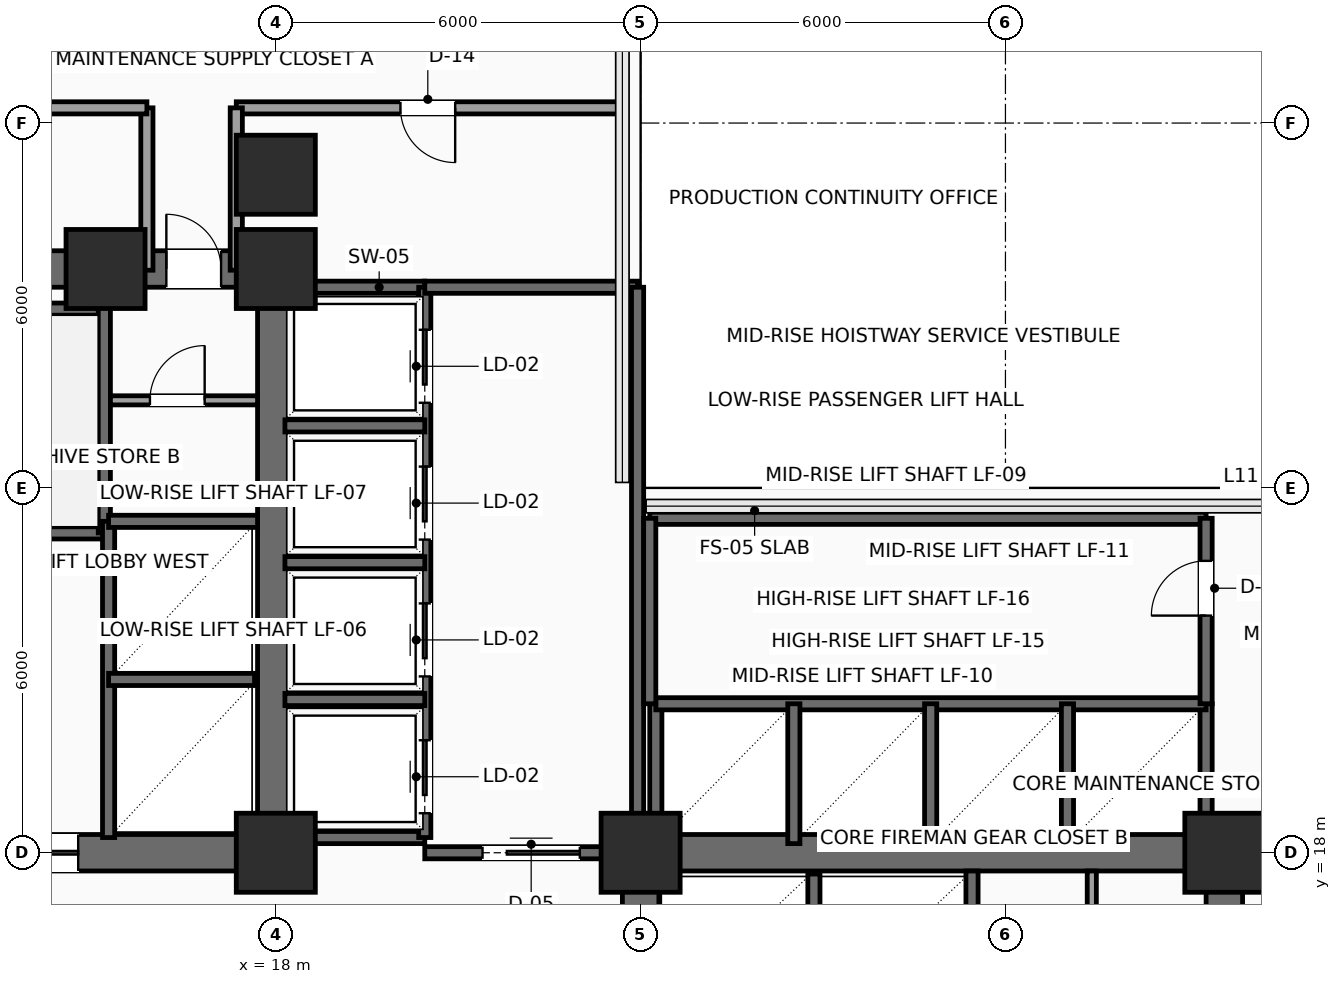
"""IFC4 building model, lengths in metres.
Left out: names, types, materials, properties, quantities, classifications, styles, units other than length and angle.
Written with IfcOpenShell. Run it as: python <this file> out.ifc"""

import sys

from ifc_helpers import new_model, si_unit, direction, frame, frame_2d, origin, origin_2d, place, context, subcontext, project, spatial, rectangle, extrude, element, fill, save


model = new_model("IFC4")
c1 = context("Model", 3, precision=1e-05, world=origin(), true_north=direction((0.0, 1.0)))
c2 = subcontext(c1, "Body", "Model", "MODEL_VIEW")
j1 = project(units=[si_unit("LENGTHUNIT", "METRE"), si_unit("PLANEANGLEUNIT", "RADIAN")], contexts=[c1])
p1 = place(None, origin())
s1 = spatial("IfcSite", under=j1, at=p1, CompositionType="ELEMENT")
p2 = place(p1, origin())
s2 = spatial("IfcBuilding", under=s1, at=p2, CompositionType="ELEMENT")
p3 = place(p2, frame((0.0, 0.0, 51.9)))
s3 = spatial("IfcBuildingStorey", under=s2, at=p3, CompositionType="ELEMENT", Elevation=51.9)
for number, where, z_axis, x_axis in (
    (1, (18.0, 18.0, 0.0), (0.0, 0.0, 1.0), (1.0, 0.0, 0.0)),
    (2, (15.2, 27.6, 0.0), (0.0, 0.0, 1.0), (1.0, 0.0, 0.0)),
    (3, (18.0, 27.6, 0.0), (0.0, 0.0, 1.0), (1.0, 0.0, 0.0)),
    (4, (24.0, 18.0, 0.0), (0.0, 0.0, 1.0), (1.0, 0.0, 0.0)),
    (5, (33.6, 18.0, 0.0), (0.0, 0.0, 1.0), (1.0, 0.0, 0.0)),
    (6, (18.0, 29.15, 0.0), (0.0, 0.0, 1.0), (1.0, 0.0, 0.0)),
):
    element("IfcColumn", number, at=place(p3, frame(where, z_axis=z_axis, x_axis=x_axis)), inside=s3, PredefinedType="COLUMN", context=c2, shape_type="SweptSolid", body=[
        extrude(rectangle(XDim=1.3, YDim=1.3, at=origin_2d()), origin(), (0.0, 0.0, 1.0), 3.9),
    ])
p4 = place(p3, frame((6.0, 18.0, 0.0), z_axis=(0.0, 0.0, 1.0), x_axis=(1.0, 0.0, 0.0)))
e7 = element("IfcWall", 7, at=p4, inside=s3, PredefinedType="SHEAR", context=c2, shape_type="SweptSolid", body=[
    extrude(rectangle(XDim=12.0, YDim=0.6, at=frame_2d((6.0, 0.0))), origin(), (0.0, 0.0, 1.0), 3.65),
])
p5 = place(p4, frame((7.15, 0.0, 0.0)))
e8 = element("IfcOpeningElement", 8, at=p5, cuts=e7, PredefinedType="OPENING", context=c2, shape_type="SweptSolid", body=[
    extrude(rectangle(XDim=1.6, YDim=2.3, at=frame_2d((0.8, 1.15))), frame((0.0, 0.31, 0.0), z_axis=(0.0, -1.0, 0.0), x_axis=(1.0, 0.0, 0.0)), (0.0, 0.0, 1.0), 0.62),
])
p6 = place(p3, frame((6.0, 27.6, 0.0), z_axis=(0.0, 0.0, 1.0), x_axis=(1.0, 0.0, 0.0)))
e9 = element("IfcWall", 9, at=p6, inside=s3, PredefinedType="SHEAR", context=c2, shape_type="SweptSolid", body=[
    extrude(rectangle(XDim=12.0, YDim=0.6, at=frame_2d((6.0, 0.0))), origin(), (0.0, 0.0, 1.0), 3.65),
])
p7 = place(p6, frame((10.2, 0.0, 0.0)))
e10 = element("IfcOpeningElement", 10, at=p7, cuts=e9, PredefinedType="OPENING", context=c2, shape_type="SweptSolid", body=[
    extrude(rectangle(XDim=0.9, YDim=2.15, at=frame_2d((0.45, 1.075))), frame((0.0, 0.31, 0.0), z_axis=(0.0, -1.0, 0.0), x_axis=(1.0, 0.0, 0.0)), (0.0, 0.0, 1.0), 0.62),
])
for number, where, z_axis, x_axis in (
    (11, (18.0, 18.0, 0.0), (0.0, 0.0, 1.0), (0.0, 1.0, 0.0)),
    (12, (24.0, 18.0, 0.0), (0.0, 0.0, 1.0), (1.0, 0.0, 0.0)),
):
    element("IfcWall", number, at=place(p3, frame(where, z_axis=z_axis, x_axis=x_axis)), inside=s3, PredefinedType="SHEAR", context=c2, shape_type="SweptSolid", body=[
        extrude(rectangle(XDim=9.6, YDim=0.6, at=frame_2d((4.8, 0.0))), origin(), (0.0, 0.0, 1.0), 3.65),
    ])
p8 = place(p3, frame((24.0, 6.0, 0.0), z_axis=(0.0, 0.0, 1.0), x_axis=(0.0, 1.0, 0.0)))
e13 = element("IfcWall", 13, at=p8, inside=s3, PredefinedType="SHEAR", context=c2, shape_type="SweptSolid", body=[
    extrude(rectangle(XDim=12.0, YDim=0.6, at=frame_2d((6.0, 0.0))), origin(), (0.0, 0.0, 1.0), 3.65),
])
p9 = place(p8, frame((7.15, 0.0, 0.0)))
e14 = element("IfcOpeningElement", 14, at=p9, cuts=e13, PredefinedType="OPENING", context=c2, shape_type="SweptSolid", body=[
    extrude(rectangle(XDim=1.6, YDim=2.3, at=frame_2d((0.8, 1.15))), frame((0.0, 0.31, 0.0), z_axis=(0.0, -1.0, 0.0), x_axis=(1.0, 0.0, 0.0)), (0.0, 0.0, 1.0), 0.62),
])
p10 = place(p3, frame((33.6, 6.0, 0.0), z_axis=(0.0, 0.0, 1.0), x_axis=(0.0, 1.0, 0.0)))
e15 = element("IfcWall", 15, at=p10, inside=s3, PredefinedType="SHEAR", context=c2, shape_type="SweptSolid", body=[
    extrude(rectangle(XDim=12.0, YDim=0.6, at=frame_2d((6.0, 0.0))), origin(), (0.0, 0.0, 1.0), 3.65),
])
p11 = place(p10, frame((10.2, 0.0, 0.0)))
e16 = element("IfcOpeningElement", 16, at=p11, cuts=e15, PredefinedType="OPENING", context=c2, shape_type="SweptSolid", body=[
    extrude(rectangle(XDim=0.9, YDim=2.15, at=frame_2d((0.45, 1.075))), frame((0.0, 0.31, 0.0), z_axis=(0.0, -1.0, 0.0), x_axis=(1.0, 0.0, 0.0)), (0.0, 0.0, 1.0), 0.62),
])
p12 = place(p3, frame((6.3, 23.26, 0.0), z_axis=(0.0, 0.0, 1.0), x_axis=(1.0, 0.0, 0.0)))
e17 = element("IfcWall", 17, at=p12, inside=s3, PredefinedType="SHEAR", context=c2, shape_type="SweptSolid", body=[
    extrude(rectangle(XDim=8.88, YDim=0.2, at=frame_2d((4.44, 0.0))), origin(), (0.0, 0.0, 1.0), 3.65),
])
p13 = place(p12, frame((0.35, 0.0, 0.0)))
e18 = element("IfcOpeningElement", 18, at=p13, cuts=e17, PredefinedType="OPENING", context=c2, shape_type="SweptSolid", body=[
    extrude(rectangle(XDim=1.1, YDim=2.2, at=frame_2d((0.55, 1.1))), frame((0.0, 0.11, 0.0), z_axis=(0.0, -1.0, 0.0), x_axis=(1.0, 0.0, 0.0)), (0.0, 0.0, 1.0), 0.22),
])
p14 = place(p3, frame((6.3, 26.94, 0.0), z_axis=(0.0, 0.0, 1.0), x_axis=(1.0, 0.0, 0.0)))
e19 = element("IfcWall", 19, at=p14, inside=s3, PredefinedType="SHEAR", context=c2, shape_type="SweptSolid", body=[
    extrude(rectangle(XDim=8.88, YDim=0.2, at=frame_2d((4.44, 0.0))), origin(), (0.0, 0.0, 1.0), 3.65),
])
p15 = place(p3, frame((15.18, 23.26, 0.0), z_axis=(0.0, 0.0, 1.0), x_axis=(0.0, 1.0, 0.0)))
e20 = element("IfcWall", 20, at=p15, inside=s3, PredefinedType="SHEAR", context=c2, shape_type="SweptSolid", body=[
    extrude(rectangle(XDim=4.04, YDim=0.2, at=frame_2d((2.02, 0.0))), origin(), (0.0, 0.0, 1.0), 3.65),
])
p16 = place(p3, frame((15.25, 18.25, 0.0), z_axis=(0.0, 0.0, 1.0), x_axis=(0.0, 1.0, 0.0)))
e21 = element("IfcWall", 21, at=p16, inside=s3, PredefinedType="SHEAR", context=c2, shape_type="SweptSolid", body=[
    extrude(rectangle(XDim=5.2, YDim=0.2, at=frame_2d((2.6, 0.0))), origin(), (0.0, 0.0, 1.0), 3.65),
])
p17 = place(p3, frame((15.25, 20.85, 0.0), z_axis=(0.0, 0.0, 1.0), x_axis=(1.0, 0.0, 0.0)))
e22 = element("IfcWall", 22, at=p17, inside=s3, PredefinedType="SHEAR", context=c2, shape_type="SweptSolid", body=[
    extrude(rectangle(XDim=2.4, YDim=0.2, at=frame_2d((1.2, 0.0))), origin(), (0.0, 0.0, 1.0), 3.65),
])
p18 = place(p3, frame((15.25, 23.45, 0.0), z_axis=(0.0, 0.0, 1.0), x_axis=(1.0, 0.0, 0.0)))
e23 = element("IfcWall", 23, at=p18, inside=s3, PredefinedType="SHEAR", context=c2, shape_type="SweptSolid", body=[
    extrude(rectangle(XDim=2.45, YDim=0.2, at=frame_2d((1.225, 0.0))), origin(), (0.0, 0.0, 1.0), 3.65),
])
p19 = place(p3, frame((26.85, 15.25, 0.0), z_axis=(0.0, 0.0, 1.0), x_axis=(0.0, 1.0, 0.0)))
e24 = element("IfcWall", 24, at=p19, inside=s3, PredefinedType="SHEAR", context=c2, shape_type="SweptSolid", body=[
    extrude(rectangle(XDim=2.4, YDim=0.2, at=frame_2d((1.2, 0.0))), origin(), (0.0, 0.0, 1.0), 3.65),
])
p20 = place(p3, frame((29.45, 15.25, 0.0), z_axis=(0.0, 0.0, 1.0), x_axis=(0.0, 1.0, 0.0)))
e25 = element("IfcWall", 25, at=p20, inside=s3, PredefinedType="SHEAR", context=c2, shape_type="SweptSolid", body=[
    extrude(rectangle(XDim=2.45, YDim=0.2, at=frame_2d((1.225, 0.0))), origin(), (0.0, 0.0, 1.0), 3.65),
])
p21 = place(p3, frame((15.28, 25.44, 0.0), z_axis=(0.0, 0.0, 1.0), x_axis=(1.0, 0.0, 0.0)))
e26 = element("IfcWall", 26, at=p21, inside=s3, PredefinedType="PARTITIONING", context=c2, shape_type="SweptSolid", body=[
    extrude(rectangle(XDim=2.42, YDim=0.15, at=frame_2d((1.21, 0.0))), origin(), (0.0, 0.0, 1.0), 3.65),
])
p22 = place(p21, frame((0.65, 0.0, 0.0)))
e27 = element("IfcOpeningElement", 27, at=p22, cuts=e26, PredefinedType="OPENING", context=c2, shape_type="SweptSolid", body=[
    extrude(rectangle(XDim=0.9, YDim=2.15, at=frame_2d((0.45, 1.075))), frame((0.0, 0.085, 0.0), z_axis=(0.0, -1.0, 0.0), x_axis=(1.0, 0.0, 0.0)), (0.0, 0.0, 1.0), 0.17),
])
p23 = place(p3, frame((31.42, 15.28, 0.0), z_axis=(0.0, 0.0, 1.0), x_axis=(0.0, 1.0, 0.0)))
e28 = element("IfcWall", 28, at=p23, inside=s3, PredefinedType="PARTITIONING", context=c2, shape_type="SweptSolid", body=[
    extrude(rectangle(XDim=2.42, YDim=0.15, at=frame_2d((1.21, 0.0))), origin(), (0.0, 0.0, 1.0), 3.65),
])
p24 = place(p23, frame((0.65, 0.0, 0.0)))
e29 = element("IfcOpeningElement", 29, at=p24, cuts=e28, PredefinedType="OPENING", context=c2, shape_type="SweptSolid", body=[
    extrude(rectangle(XDim=0.9, YDim=2.15, at=frame_2d((0.45, 1.075))), frame((0.0, 0.085, 0.0), z_axis=(0.0, -1.0, 0.0), x_axis=(1.0, 0.0, 0.0)), (0.0, 0.0, 1.0), 0.17),
])
for number, where, z_axis, x_axis in (
    (30, (18.1, 27.3, 0.0), (0.0, 0.0, 1.0), (1.0, 0.0, 0.0)),
    (31, (18.1, 18.25, 0.0), (0.0, 0.0, 1.0), (1.0, 0.0, 0.0)),
):
    element("IfcWall", number, at=place(p3, frame(where, z_axis=z_axis, x_axis=x_axis)), inside=s3, PredefinedType="SHEAR", context=c2, shape_type="SweptSolid", body=[
        extrude(rectangle(XDim=2.35, YDim=0.2, at=frame_2d((1.175, 0.0))), origin(), (0.0, 0.0, 1.0), 3.65),
    ])
p25 = place(p3, frame((20.45, 18.25, 0.0), z_axis=(0.0, 0.0, 1.0), x_axis=(0.0, 1.0, 0.0)))
e32 = element("IfcWall", 32, at=p25, inside=s3, PredefinedType="SHEAR", context=c2, shape_type="SweptSolid", body=[
    extrude(rectangle(XDim=9.05, YDim=0.2, at=frame_2d((4.525, 0.0))), origin(), (0.0, 0.0, 1.0), 3.65),
])
p26 = place(p25, frame((0.4, 0.0, 0.0)))
e33 = element("IfcOpeningElement", 33, at=p26, cuts=e32, PredefinedType="OPENING", context=c2, shape_type="SweptSolid", body=[
    extrude(rectangle(XDim=1.2, YDim=2.2, at=frame_2d((0.6, 1.1))), frame((0.0, 0.11, 0.0), z_axis=(0.0, -1.0, 0.0), x_axis=(1.0, 0.0, 0.0)), (0.0, 0.0, 1.0), 0.22),
])
p27 = place(p25, frame((2.65, 0.0, 0.0)))
e34 = element("IfcOpeningElement", 34, at=p27, cuts=e32, PredefinedType="OPENING", context=c2, shape_type="SweptSolid", body=[
    extrude(rectangle(XDim=1.2, YDim=2.2, at=frame_2d((0.6, 1.1))), frame((0.0, 0.11, 0.0), z_axis=(0.0, -1.0, 0.0), x_axis=(1.0, 0.0, 0.0)), (0.0, 0.0, 1.0), 0.22),
])
p28 = place(p25, frame((4.9, 0.0, 0.0)))
e35 = element("IfcOpeningElement", 35, at=p28, cuts=e32, PredefinedType="OPENING", context=c2, shape_type="SweptSolid", body=[
    extrude(rectangle(XDim=1.2, YDim=2.2, at=frame_2d((0.6, 1.1))), frame((0.0, 0.11, 0.0), z_axis=(0.0, -1.0, 0.0), x_axis=(1.0, 0.0, 0.0)), (0.0, 0.0, 1.0), 0.22),
])
p29 = place(p25, frame((7.15, 0.0, 0.0)))
e36 = element("IfcOpeningElement", 36, at=p29, cuts=e32, PredefinedType="OPENING", context=c2, shape_type="SweptSolid", body=[
    extrude(rectangle(XDim=1.2, YDim=2.2, at=frame_2d((0.6, 1.1))), frame((0.0, 0.11, 0.0), z_axis=(0.0, -1.0, 0.0), x_axis=(1.0, 0.0, 0.0)), (0.0, 0.0, 1.0), 0.22),
])
for number, where, z_axis, x_axis in (
    (37, (18.15, 20.52, 0.0), (0.0, 0.0, 1.0), (1.0, 0.0, 0.0)),
    (38, (18.15, 22.77, 0.0), (0.0, 0.0, 1.0), (1.0, 0.0, 0.0)),
    (39, (18.15, 25.02, 0.0), (0.0, 0.0, 1.0), (1.0, 0.0, 0.0)),
):
    element("IfcWall", number, at=place(p3, frame(where, z_axis=z_axis, x_axis=x_axis)), inside=s3, PredefinedType="SHEAR", context=c2, shape_type="SweptSolid", body=[
        extrude(rectangle(XDim=2.3, YDim=0.2, at=frame_2d((1.15, 0.0))), origin(), (0.0, 0.0, 1.0), 3.65),
    ])
p30 = place(p3, frame((20.45, 18.0, 0.0), z_axis=(0.0, 0.0, 1.0), x_axis=(1.0, 0.0, 0.0)))
e40 = element("IfcWall", 40, at=p30, inside=s3, PredefinedType="SHEAR", context=c2, shape_type="SweptSolid", body=[
    extrude(rectangle(XDim=3.5, YDim=0.2, at=frame_2d((1.75, 0.0))), origin(), (0.0, 0.0, 1.0), 3.65),
])
p31 = place(p30, frame((0.95, 0.0, 0.0)))
e41 = element("IfcOpeningElement", 41, at=p31, cuts=e40, PredefinedType="OPENING", context=c2, shape_type="SweptSolid", body=[
    extrude(rectangle(XDim=1.6, YDim=2.3, at=frame_2d((0.8, 1.15))), frame((0.0, 0.11, 0.0), z_axis=(0.0, -1.0, 0.0), x_axis=(1.0, 0.0, 0.0)), (0.0, 0.0, 1.0), 0.22),
])
p32 = place(p3, frame((20.45, 27.3, 0.0), z_axis=(0.0, 0.0, 1.0), x_axis=(1.0, 0.0, 0.0)))
e42 = element("IfcWall", 42, at=p32, inside=s3, PredefinedType="SHEAR", context=c2, shape_type="SweptSolid", body=[
    extrude(rectangle(XDim=3.5, YDim=0.2, at=frame_2d((1.75, 0.0))), origin(), (0.0, 0.0, 1.0), 3.65),
])
p33 = place(p3, frame((23.95, 18.0, 0.0), z_axis=(0.0, 0.0, 1.0), x_axis=(0.0, 1.0, 0.0)))
e43 = element("IfcWall", 43, at=p33, inside=s3, PredefinedType="SHEAR", context=c2, shape_type="SweptSolid", body=[
    extrude(rectangle(XDim=9.3, YDim=0.2, at=frame_2d((4.65, 0.0))), origin(), (0.0, 0.0, 1.0), 3.65),
])
for number, where, z_axis, x_axis in (
    (44, (33.3, 18.1, 0.0), (0.0, 0.0, 1.0), (0.0, 1.0, 0.0)),
    (45, (24.25, 18.1, 0.0), (0.0, 0.0, 1.0), (0.0, 1.0, 0.0)),
):
    element("IfcWall", number, at=place(p3, frame(where, z_axis=z_axis, x_axis=x_axis)), inside=s3, PredefinedType="SHEAR", context=c2, shape_type="SweptSolid", body=[
        extrude(rectangle(XDim=2.35, YDim=0.2, at=frame_2d((1.175, 0.0))), origin(), (0.0, 0.0, 1.0), 3.65),
    ])
p34 = place(p3, frame((24.25, 20.45, 0.0), z_axis=(0.0, 0.0, 1.0), x_axis=(1.0, 0.0, 0.0)))
e46 = element("IfcWall", 46, at=p34, inside=s3, PredefinedType="SHEAR", context=c2, shape_type="SweptSolid", body=[
    extrude(rectangle(XDim=9.05, YDim=0.2, at=frame_2d((4.525, 0.0))), origin(), (0.0, 0.0, 1.0), 3.65),
])
for number, where, z_axis, x_axis in (
    (47, (26.52, 18.15, 0.0), (0.0, 0.0, 1.0), (0.0, 1.0, 0.0)),
    (48, (28.77, 18.15, 0.0), (0.0, 0.0, 1.0), (0.0, 1.0, 0.0)),
    (49, (31.02, 18.15, 0.0), (0.0, 0.0, 1.0), (0.0, 1.0, 0.0)),
):
    element("IfcWall", number, at=place(p3, frame(where, z_axis=z_axis, x_axis=x_axis)), inside=s3, PredefinedType="SHEAR", context=c2, shape_type="SweptSolid", body=[
        extrude(rectangle(XDim=2.3, YDim=0.2, at=frame_2d((1.15, 0.0))), origin(), (0.0, 0.0, 1.0), 3.65),
    ])
p35 = place(p3, frame((24.15, 23.5, 0.0), z_axis=(0.0, 0.0, 1.0), x_axis=(1.0, 0.0, 0.0)))
e50 = element("IfcWall", 50, at=p35, inside=s3, PredefinedType="SHEAR", context=c2, shape_type="SweptSolid", body=[
    extrude(rectangle(XDim=9.15, YDim=0.2, at=frame_2d((4.575, 0.0))), origin(), (0.0, 0.0, 1.0), 3.65),
])
p36 = place(p3, frame((33.3, 20.45, 0.0), z_axis=(0.0, 0.0, 1.0), x_axis=(0.0, 1.0, 0.0)))
e51 = element("IfcWall", 51, at=p36, inside=s3, PredefinedType="SHEAR", context=c2, shape_type="SweptSolid", body=[
    extrude(rectangle(XDim=3.05, YDim=0.2, at=frame_2d((1.525, 0.0))), origin(), (0.0, 0.0, 1.0), 3.65),
])
p37 = place(p36, frame((1.45, 0.0, 0.0)))
e52 = element("IfcOpeningElement", 52, at=p37, cuts=e51, PredefinedType="OPENING", context=c2, shape_type="SweptSolid", body=[
    extrude(rectangle(XDim=0.9, YDim=2.15, at=frame_2d((0.45, 1.075))), frame((0.0, 0.11, 0.0), z_axis=(0.0, -1.0, 0.0), x_axis=(1.0, 0.0, 0.0)), (0.0, 0.0, 1.0), 0.22),
])
p38 = place(p3, frame((24.15, 20.45, 0.0), z_axis=(0.0, 0.0, 1.0), x_axis=(0.0, 1.0, 0.0)))
e53 = element("IfcWall", 53, at=p38, inside=s3, PredefinedType="SHEAR", context=c2, shape_type="SweptSolid", body=[
    extrude(rectangle(XDim=3.05, YDim=0.2, at=frame_2d((1.525, 0.0))), origin(), (0.0, 0.0, 1.0), 3.65),
])
p39 = place(p3, frame((23.7, 30.25, 0.0), z_axis=(0.0, 0.0, 1.0), x_axis=(-1.0, 0.0, 0.0)))
e54 = element("IfcWall", 54, at=p39, inside=s3, PredefinedType="PARTITIONING", context=c2, shape_type="SweptSolid", body=[
    extrude(rectangle(XDim=6.35, YDim=0.2, at=frame_2d((3.175, 0.0))), origin(), (0.0, 0.0, 1.0), 3.65),
])
p40 = place(p39, frame((2.75, 0.0, 0.0)))
e55 = element("IfcOpeningElement", 55, at=p40, cuts=e54, PredefinedType="OPENING", context=c2, shape_type="SweptSolid", body=[
    extrude(rectangle(XDim=0.9, YDim=2.1, at=frame_2d((0.45, 1.05))), frame((0.0, 0.11, 0.0), z_axis=(0.0, -1.0, 0.0), x_axis=(1.0, 0.0, 0.0)), (0.0, 0.0, 1.0), 0.22),
])
for number, where, z_axis, x_axis in (
    (56, (17.35, 30.25, 0.0), (0.0, 0.0, 1.0), (0.0, -1.0, 0.0)),
    (57, (15.88, 27.58, 0.0), (0.0, 0.0, 1.0), (0.0, 1.0, 0.0)),
):
    element("IfcWall", number, at=place(p3, frame(where, z_axis=z_axis, x_axis=x_axis)), inside=s3, PredefinedType="PARTITIONING", context=c2, shape_type="SweptSolid", body=[
        extrude(rectangle(XDim=2.67, YDim=0.2, at=frame_2d((1.335, 0.0))), origin(), (0.0, 0.0, 1.0), 3.65),
    ])
p41 = place(p3, frame((15.88, 30.25, 0.0), z_axis=(0.0, 0.0, 1.0), x_axis=(-1.0, 0.0, 0.0)))
e58 = element("IfcWall", 58, at=p41, inside=s3, PredefinedType="PARTITIONING", context=c2, shape_type="SweptSolid", body=[
    extrude(rectangle(XDim=10.63, YDim=0.2, at=frame_2d((5.315, 0.0))), origin(), (0.0, 0.0, 1.0), 3.65),
])
p42 = place(p41, frame((6.13, 0.0, 0.0)))
e59 = element("IfcOpeningElement", 59, at=p42, cuts=e58, PredefinedType="OPENING", context=c2, shape_type="SweptSolid", body=[
    extrude(rectangle(XDim=0.9, YDim=2.1, at=frame_2d((0.45, 1.05))), frame((0.0, 0.11, 0.0), z_axis=(0.0, -1.0, 0.0), x_axis=(1.0, 0.0, 0.0)), (0.0, 0.0, 1.0), 0.22),
])
p43 = place(p5, origin())
e60 = element("IfcDoor", 60, at=p43, inside=s3, OperationType="DOUBLE_DOOR_SLIDING", PredefinedType="DOOR", context=c2, shape_type="SweptSolid", body=[
    extrude(rectangle(XDim=1.6, YDim=2.3, at=frame_2d((0.8, 1.15))), frame((0.0, 0.025, 0.0), z_axis=(0.0, -1.0, 0.0), x_axis=(1.0, 0.0, 0.0)), (0.0, 0.0, 1.0), 0.05),
])
fill(e8, e60)
p44 = place(p7, origin())
e61 = element("IfcDoor", 61, at=p44, inside=s3, OperationType="SINGLE_SWING_LEFT", PredefinedType="DOOR", context=c2, shape_type="SweptSolid", body=[
    extrude(rectangle(XDim=0.9, YDim=2.15, at=frame_2d((0.45, 1.075))), frame((0.0, 0.025, 0.0), z_axis=(0.0, -1.0, 0.0), x_axis=(1.0, 0.0, 0.0)), (0.0, 0.0, 1.0), 0.05),
])
fill(e10, e61)
p45 = place(p22, origin())
e62 = element("IfcDoor", 62, at=p45, inside=s3, OperationType="SINGLE_SWING_RIGHT", PredefinedType="DOOR", context=c2, shape_type="SweptSolid", body=[
    extrude(rectangle(XDim=0.9, YDim=2.15, at=frame_2d((0.45, 1.075))), frame((0.0, 0.025, 0.0), z_axis=(0.0, -1.0, 0.0), x_axis=(1.0, 0.0, 0.0)), (0.0, 0.0, 1.0), 0.05),
])
fill(e27, e62)
p46 = place(p26, origin())
e63 = element("IfcDoor", 63, at=p46, inside=s3, OperationType="SLIDING_TO_RIGHT", PredefinedType="DOOR", context=c2, shape_type="SweptSolid", body=[
    extrude(rectangle(XDim=1.2, YDim=2.2, at=frame_2d((0.6, 1.1))), frame((0.0, 0.025, 0.0), z_axis=(0.0, -1.0, 0.0), x_axis=(1.0, 0.0, 0.0)), (0.0, 0.0, 1.0), 0.05),
])
fill(e33, e63)
p47 = place(p27, origin())
e64 = element("IfcDoor", 64, at=p47, inside=s3, OperationType="SLIDING_TO_RIGHT", PredefinedType="DOOR", context=c2, shape_type="SweptSolid", body=[
    extrude(rectangle(XDim=1.2, YDim=2.2, at=frame_2d((0.6, 1.1))), frame((0.0, 0.025, 0.0), z_axis=(0.0, -1.0, 0.0), x_axis=(1.0, 0.0, 0.0)), (0.0, 0.0, 1.0), 0.05),
])
fill(e34, e64)
p48 = place(p28, origin())
e65 = element("IfcDoor", 65, at=p48, inside=s3, OperationType="SLIDING_TO_RIGHT", PredefinedType="DOOR", context=c2, shape_type="SweptSolid", body=[
    extrude(rectangle(XDim=1.2, YDim=2.2, at=frame_2d((0.6, 1.1))), frame((0.0, 0.025, 0.0), z_axis=(0.0, -1.0, 0.0), x_axis=(1.0, 0.0, 0.0)), (0.0, 0.0, 1.0), 0.05),
])
fill(e35, e65)
p49 = place(p29, origin())
e66 = element("IfcDoor", 66, at=p49, inside=s3, OperationType="SLIDING_TO_RIGHT", PredefinedType="DOOR", context=c2, shape_type="SweptSolid", body=[
    extrude(rectangle(XDim=1.2, YDim=2.2, at=frame_2d((0.6, 1.1))), frame((0.0, 0.025, 0.0), z_axis=(0.0, -1.0, 0.0), x_axis=(1.0, 0.0, 0.0)), (0.0, 0.0, 1.0), 0.05),
])
fill(e36, e66)
p50 = place(p31, origin())
e67 = element("IfcDoor", 67, at=p50, inside=s3, OperationType="DOUBLE_DOOR_SLIDING", PredefinedType="DOOR", context=c2, shape_type="SweptSolid", body=[
    extrude(rectangle(XDim=1.6, YDim=2.3, at=frame_2d((0.8, 1.15))), frame((0.0, 0.025, 0.0), z_axis=(0.0, -1.0, 0.0), x_axis=(1.0, 0.0, 0.0)), (0.0, 0.0, 1.0), 0.05),
])
fill(e41, e67)
p51 = place(p37, origin())
e68 = element("IfcDoor", 68, at=p51, inside=s3, OperationType="SINGLE_SWING_LEFT", PredefinedType="DOOR", context=c2, shape_type="SweptSolid", body=[
    extrude(rectangle(XDim=0.9, YDim=2.15, at=frame_2d((0.45, 1.075))), frame((0.0, 0.025, 0.0), z_axis=(0.0, -1.0, 0.0), x_axis=(1.0, 0.0, 0.0)), (0.0, 0.0, 1.0), 0.05),
])
fill(e52, e68)
p52 = place(p40, origin())
e69 = element("IfcDoor", 69, at=p52, inside=s3, OperationType="SINGLE_SWING_LEFT", PredefinedType="DOOR", context=c2, shape_type="SweptSolid", body=[
    extrude(rectangle(XDim=0.9, YDim=2.1, at=frame_2d((0.45, 1.05))), frame((0.0, 0.025, 0.0), z_axis=(0.0, -1.0, 0.0), x_axis=(1.0, 0.0, 0.0)), (0.0, 0.0, 1.0), 0.05),
])
fill(e55, e69)
save(model, sys.argv[1])
